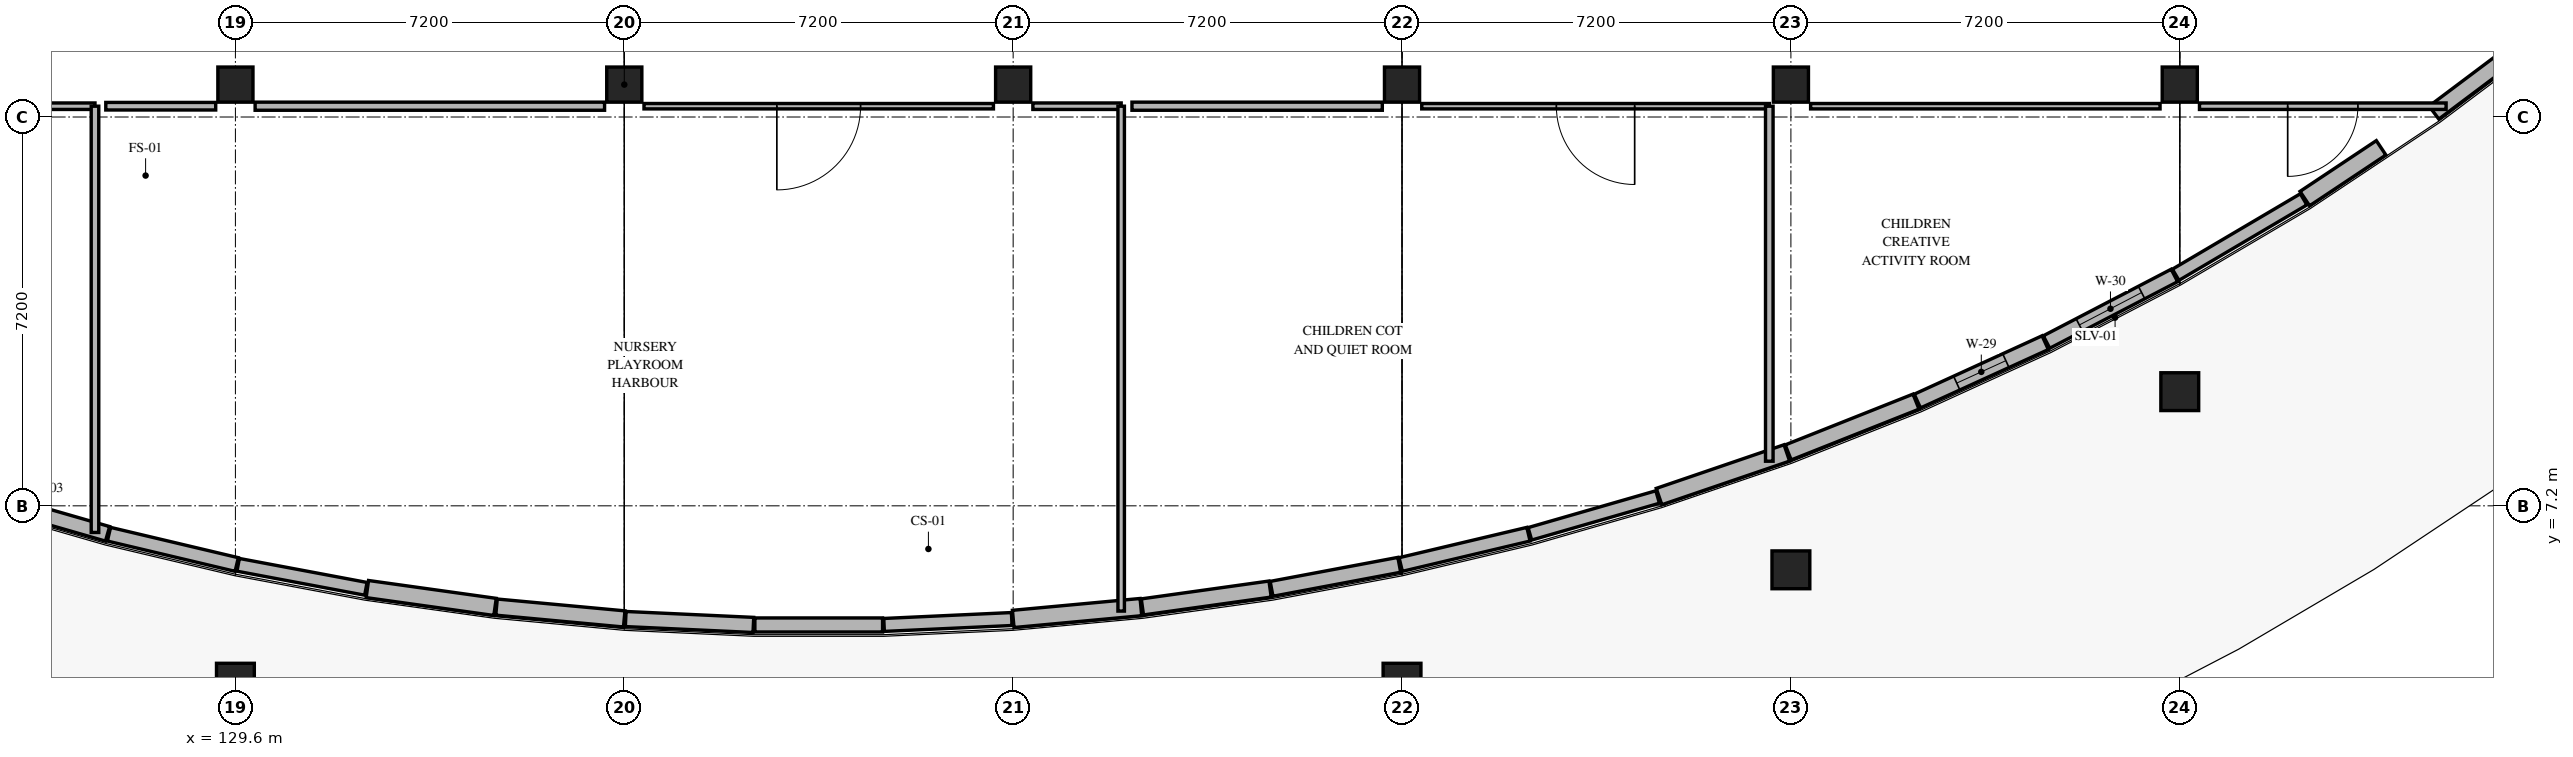
"""IFC4 building model, lengths in metres.
Left out: names, types, materials, properties, quantities, classifications, styles, units other than length and angle.
Written with IfcOpenShell. Run it as: python <this file> out.ifc"""

import sys

from ifc_helpers import new_model, si_unit, direction, frame, frame_2d, origin, origin_2d, place, context, subcontext, project, spatial, rectangle, extrude, element, fill, save


model = new_model("IFC4")
c1 = context("Model", 3, precision=1e-05, world=origin(), true_north=direction((0.0, 1.0)))
c2 = subcontext(c1, "Body", "Model", "MODEL_VIEW")
j1 = project(units=[si_unit("LENGTHUNIT", "METRE"), si_unit("PLANEANGLEUNIT", "RADIAN")], contexts=[c1])
p1 = place(None, origin())
s1 = spatial("IfcSite", under=j1, at=p1, CompositionType="ELEMENT")
p2 = place(p1, origin())
s2 = spatial("IfcBuilding", under=s1, at=p2, CompositionType="ELEMENT")
p3 = place(p2, origin())
s3 = spatial("IfcBuildingStorey", under=s2, at=p3, CompositionType="ELEMENT", Elevation=0.0)
p4 = place(p3, frame((129.6, 3.934, 0.0), z_axis=(0.0, 0.0, 1.0), x_axis=(1.0, 0.0, 0.0)))
e1 = element("IfcColumn", 1, at=p4, inside=s3, PredefinedType="COLUMN", context=c2, shape_type="SweptSolid", body=[
    extrude(rectangle(XDim=0.7, YDim=0.7, at=origin_2d()), origin(), (0.0, 0.0, 1.0), 4.5),
])
for number, where, z_axis, x_axis in (
    (2, (129.6, 15.0, 0.0), (0.0, 0.0, 1.0), (1.0, 0.0, 0.0)),
    (3, (136.8, 15.0, 0.0), (0.0, 0.0, 1.0), (1.0, 0.0, 0.0)),
    (4, (144.0, 15.0, 0.0), (0.0, 0.0, 1.0), (1.0, 0.0, 0.0)),
):
    element("IfcColumn", number, at=place(p3, frame(where, z_axis=z_axis, x_axis=x_axis)), inside=s3, PredefinedType="COLUMN", context=c2, shape_type="SweptSolid", body=[
        extrude(rectangle(XDim=0.65, YDim=0.65, at=origin_2d()), origin(), (0.0, 0.0, 1.0), 4.5),
    ])
p5 = place(p3, frame((151.2, 3.934, 0.0), z_axis=(0.0, 0.0, 1.0), x_axis=(1.0, 0.0, 0.0)))
e5 = element("IfcColumn", 5, at=p5, inside=s3, PredefinedType="COLUMN", context=c2, shape_type="SweptSolid", body=[
    extrude(rectangle(XDim=0.7, YDim=0.7, at=origin_2d()), origin(), (0.0, 0.0, 1.0), 4.5),
])
p6 = place(p3, frame((151.2, 15.0, 0.0), z_axis=(0.0, 0.0, 1.0), x_axis=(1.0, 0.0, 0.0)))
e6 = element("IfcColumn", 6, at=p6, inside=s3, PredefinedType="COLUMN", context=c2, shape_type="SweptSolid", body=[
    extrude(rectangle(XDim=0.65, YDim=0.65, at=origin_2d()), origin(), (0.0, 0.0, 1.0), 4.5),
])
p7 = place(p3, frame((158.4, 6.015, 0.0), z_axis=(0.0, 0.0, 1.0), x_axis=(1.0, 0.0, 0.0)))
e7 = element("IfcColumn", 7, at=p7, inside=s3, PredefinedType="COLUMN", context=c2, shape_type="SweptSolid", body=[
    extrude(rectangle(XDim=0.7, YDim=0.7, at=origin_2d()), origin(), (0.0, 0.0, 1.0), 4.5),
])
p8 = place(p3, frame((158.4, 15.0, 0.0), z_axis=(0.0, 0.0, 1.0), x_axis=(1.0, 0.0, 0.0)))
e8 = element("IfcColumn", 8, at=p8, inside=s3, PredefinedType="COLUMN", context=c2, shape_type="SweptSolid", body=[
    extrude(rectangle(XDim=0.65, YDim=0.65, at=origin_2d()), origin(), (0.0, 0.0, 1.0), 4.5),
])
p9 = place(p3, frame((165.6, 9.314, 0.0), z_axis=(0.0, 0.0, 1.0), x_axis=(1.0, 0.0, 0.0)))
e9 = element("IfcColumn", 9, at=p9, inside=s3, PredefinedType="COLUMN", context=c2, shape_type="SweptSolid", body=[
    extrude(rectangle(XDim=0.7, YDim=0.7, at=origin_2d()), origin(), (0.0, 0.0, 1.0), 4.5),
])
p10 = place(p3, frame((165.6, 15.0, 0.0), z_axis=(0.0, 0.0, 1.0), x_axis=(1.0, 0.0, 0.0)))
e10 = element("IfcColumn", 10, at=p10, inside=s3, PredefinedType="COLUMN", context=c2, shape_type="SweptSolid", body=[
    extrude(rectangle(XDim=0.65, YDim=0.65, at=origin_2d()), origin(), (0.0, 0.0, 1.0), 4.5),
])
p11 = place(p3, frame((127.233, 6.681, 0.0), z_axis=(0.0, 0.0, 1.0), x_axis=(-0.960873855282, 0.276986343049, 0.0)))
e11 = element("IfcWall", 11, at=p11, inside=s3, PredefinedType="SOLIDWALL", context=c2, shape_type="SweptSolid", body=[
    extrude(rectangle(XDim=2.462, YDim=0.28, at=frame_2d((1.231, 0.0))), origin(), (0.0, 0.0, 1.0), 4.24),
])
p12 = place(p3, frame((129.624, 6.113, 0.0), z_axis=(0.0, 0.0, 1.0), x_axis=(-0.972996641293, 0.230819271363, 0.0)))
e12 = element("IfcWall", 12, at=p12, inside=s3, PredefinedType="SOLIDWALL", context=c2, shape_type="SweptSolid", body=[
    extrude(rectangle(XDim=2.431, YDim=0.26, at=frame_2d((1.215, 0.0))), origin(), (0.0, 0.0, 1.0), 3.49),
])
p13 = place(p3, frame((132.015, 5.663, 0.0), z_axis=(0.0, 0.0, 1.0), x_axis=(-0.982797435053, 0.184686766319, 0.0)))
e13 = element("IfcWall", 13, at=p13, inside=s3, PredefinedType="SOLIDWALL", context=c2, shape_type="SweptSolid", body=[
    extrude(rectangle(XDim=2.406, YDim=0.24, at=frame_2d((1.203, 0.0))), origin(), (0.0, 0.0, 1.0), 3.49),
])
p14 = place(p3, frame((134.407, 5.328, 0.0), z_axis=(0.0, 0.0, 1.0), x_axis=(-0.990366445451, 0.138471310114, 0.0)))
e14 = element("IfcWall", 14, at=p14, inside=s3, PredefinedType="SOLIDWALL", context=c2, shape_type="SweptSolid", body=[
    extrude(rectangle(XDim=2.387, YDim=0.32, at=frame_2d((1.194, 0.0))), origin(), (0.0, 0.0, 1.0), 4.24),
])
p15 = place(p3, frame((136.799, 5.106, 0.0), z_axis=(0.0, 0.0, 1.0), x_axis=(-0.995736652078, 0.092241637603, 0.0)))
e15 = element("IfcWall", 15, at=p15, inside=s3, PredefinedType="SOLIDWALL", context=c2, shape_type="SweptSolid", body=[
    extrude(rectangle(XDim=2.374, YDim=0.3, at=frame_2d((1.187, 0.0))), origin(), (0.0, 0.0, 1.0), 4.24),
])
p16 = place(p3, frame((139.19, 4.994, 0.0), z_axis=(0.0, 0.0, 1.0), x_axis=(-0.998931193279, 0.046221976305, 0.0)))
e16 = element("IfcWall", 16, at=p16, inside=s3, PredefinedType="SOLIDWALL", context=c2, shape_type="SweptSolid", body=[
    extrude(rectangle(XDim=2.366, YDim=0.28, at=frame_2d((1.183, 0.0))), origin(), (0.0, 0.0, 1.0), 4.24),
])
p17 = place(p3, frame((141.582, 4.994, 0.0), z_axis=(0.0, 0.0, 1.0), x_axis=(-1.0, 0.0, 0.0)))
e17 = element("IfcWall", 17, at=p17, inside=s3, PredefinedType="SOLIDWALL", context=c2, shape_type="SweptSolid", body=[
    extrude(rectangle(XDim=2.364, YDim=0.26, at=frame_2d((1.182, 0.0))), origin(), (0.0, 0.0, 1.0), 4.24),
])
p18 = place(p3, frame((143.974, 5.104, 0.0), z_axis=(0.0, 0.0, 1.0), x_axis=(-0.998931413674, -0.046217212984, 0.0)))
e18 = element("IfcWall", 18, at=p18, inside=s3, PredefinedType="SOLIDWALL", context=c2, shape_type="SweptSolid", body=[
    extrude(rectangle(XDim=2.366, YDim=0.24, at=frame_2d((1.183, 0.0))), origin(), (0.0, 0.0, 1.0), 4.24),
])
p19 = place(p3, frame((146.365, 5.325, 0.0), z_axis=(0.0, 0.0, 1.0), x_axis=(-0.995737526905, -0.092232193477, 0.0)))
e19 = element("IfcWall", 19, at=p19, inside=s3, PredefinedType="SOLIDWALL", context=c2, shape_type="SweptSolid", body=[
    extrude(rectangle(XDim=2.374, YDim=0.32, at=frame_2d((1.187, 0.0))), origin(), (0.0, 0.0, 1.0), 4.24),
])
p20 = place(p3, frame((148.757, 5.659, 0.0), z_axis=(0.0, 0.0, 1.0), x_axis=(-0.990368406077, -0.138457286714, 0.0)))
e20 = element("IfcWall", 20, at=p20, inside=s3, PredefinedType="SOLIDWALL", context=c2, shape_type="SweptSolid", body=[
    extrude(rectangle(XDim=2.387, YDim=0.3, at=frame_2d((1.194, 0.0))), origin(), (0.0, 0.0, 1.0), 4.24),
])
p21 = place(p3, frame((151.149, 6.107, 0.0), z_axis=(0.0, 0.0, 1.0), x_axis=(-0.982800895809, -0.184668349202, 0.0)))
e21 = element("IfcWall", 21, at=p21, inside=s3, PredefinedType="SOLIDWALL", context=c2, shape_type="SweptSolid", body=[
    extrude(rectangle(XDim=2.406, YDim=0.28, at=frame_2d((1.203, 0.0))), origin(), (0.0, 0.0, 1.0), 3.54),
])
p22 = place(p3, frame((153.541, 6.674, 0.0), z_axis=(0.0, 0.0, 1.0), x_axis=(-0.973001991893, -0.230796715253, 0.0)))
e22 = element("IfcWall", 22, at=p22, inside=s3, PredefinedType="SOLIDWALL", context=c2, shape_type="SweptSolid", body=[
    extrude(rectangle(XDim=2.431, YDim=0.26, at=frame_2d((1.215, 0.0))), origin(), (0.0, 0.0, 1.0), 3.54),
])
p23 = place(p3, frame((155.933, 7.363, 0.0), z_axis=(0.0, 0.0, 1.0), x_axis=(-0.960873855282, -0.276986343049, 0.0)))
e23 = element("IfcWall", 23, at=p23, inside=s3, PredefinedType="SOLIDWALL", context=c2, shape_type="SweptSolid", body=[
    extrude(rectangle(XDim=2.462, YDim=0.24, at=frame_2d((1.231, 0.0))), origin(), (0.0, 0.0, 1.0), 4.24),
])
p24 = place(p3, frame((158.325, 8.179, 0.0), z_axis=(0.0, 0.0, 1.0), x_axis=(-0.946353497829, -0.323133187939, 0.0)))
e24 = element("IfcWall", 24, at=p24, inside=s3, PredefinedType="SOLIDWALL", context=c2, shape_type="SweptSolid", body=[
    extrude(rectangle(XDim=2.5, YDim=0.32, at=frame_2d((1.25, 0.0))), origin(), (0.0, 0.0, 1.0), 3.49),
])
p25 = place(p3, frame((160.717, 9.129, 0.0), z_axis=(0.0, 0.0, 1.0), x_axis=(-0.929287640724, -0.369356847504, 0.0)))
e25 = element("IfcWall", 25, at=p25, inside=s3, PredefinedType="SOLIDWALL", context=c2, shape_type="SweptSolid", body=[
    extrude(rectangle(XDim=2.547, YDim=0.3, at=frame_2d((1.273, 0.0))), origin(), (0.0, 0.0, 1.0), 3.49),
])
p26 = place(p3, frame((163.109, 10.221, 0.0), z_axis=(0.0, 0.0, 1.0), x_axis=(-0.90959706885, -0.415491482873, 0.0)))
e26 = element("IfcWall", 26, at=p26, inside=s3, PredefinedType="SOLIDWALL", context=c2, shape_type="SweptSolid", body=[
    extrude(rectangle(XDim=2.603, YDim=0.28, at=frame_2d((1.301, 0.0))), origin(), (0.0, 0.0, 1.0), 3.64),
])
p27 = place(p26, frame((0.801, 0.0, 0.75)))
e27 = element("IfcOpeningElement", 27, at=p27, cuts=e26, PredefinedType="OPENING", context=c2, shape_type="SweptSolid", body=[
    extrude(rectangle(XDim=1.0, YDim=1.45, at=frame_2d((0.5, 0.725))), frame((0.0, 0.15, 0.0), z_axis=(0.0, -1.0, 0.0), x_axis=(1.0, 0.0, 0.0)), (0.0, 0.0, 1.0), 0.3),
])
p28 = place(p3, frame((165.501, 11.466, 0.0), z_axis=(0.0, 0.0, 1.0), x_axis=(-0.887029574184, -0.461712610315, 0.0)))
e28 = element("IfcWall", 28, at=p28, inside=s3, PredefinedType="SOLIDWALL", context=c2, shape_type="SweptSolid", body=[
    extrude(rectangle(XDim=2.67, YDim=0.26, at=frame_2d((1.335, 0.0))), origin(), (0.0, 0.0, 1.0), 3.59),
])
p29 = place(p28, frame((0.685, 0.0, 0.75)))
e29 = element("IfcOpeningElement", 29, at=p29, cuts=e28, PredefinedType="OPENING", context=c2, shape_type="SweptSolid", body=[
    extrude(rectangle(XDim=1.3, YDim=1.45, at=frame_2d((0.65, 0.725))), frame((0.0, 0.14, 0.0), z_axis=(0.0, -1.0, 0.0), x_axis=(1.0, 0.0, 0.0)), (0.0, 0.0, 1.0), 0.28),
])
p30 = place(p3, frame((167.893, 12.875, 0.0), z_axis=(0.0, 0.0, 1.0), x_axis=(-0.861415701697, -0.507900569866, 0.0)))
e30 = element("IfcWall", 30, at=p30, inside=s3, PredefinedType="SOLIDWALL", context=c2, shape_type="SweptSolid", body=[
    extrude(rectangle(XDim=2.75, YDim=0.24, at=frame_2d((1.375, 0.0))), origin(), (0.0, 0.0, 1.0), 3.59),
])
p31 = place(p3, frame((169.328, 13.829, 0.0), z_axis=(0.0, 0.0, 1.0), x_axis=(-0.832470617869, -0.554069192778, 0.0)))
e31 = element("IfcWall", 31, at=p31, inside=s3, PredefinedType="SOLIDWALL", context=c2, shape_type="SweptSolid", body=[
    extrude(rectangle(XDim=1.697, YDim=0.32, at=frame_2d((0.848, 0.0))), origin(), (0.0, 0.0, 1.0), 3.64),
])
p32 = place(p3, frame((172.677, 16.261, 0.0), z_axis=(0.0, 0.0, 1.0), x_axis=(-0.799762775561, -0.600316169053, 0.0)))
e32 = element("IfcWall", 32, at=p32, inside=s3, PredefinedType="SOLIDWALL", context=c2, shape_type="SweptSolid", body=[
    extrude(rectangle(XDim=2.965, YDim=0.3, at=frame_2d((1.482, 0.0))), origin(), (0.0, 0.0, 1.0), 3.49),
])
p33 = place(p3, frame((127.0, 14.6, 0.0), z_axis=(0.0, 0.0, 1.0), x_axis=(-1.0, 0.0, 0.0)))
e33 = element("IfcWall", 33, at=p33, inside=s3, PredefinedType="PARTITIONING", context=c2, shape_type="SweptSolid", body=[
    extrude(rectangle(XDim=4.235, YDim=0.12, at=frame_2d((2.118, 0.0))), origin(), (0.0, 0.0, 1.0), 4.24),
])
p34 = place(p33, frame((1.292, 0.0, 0.0)))
e34 = element("IfcOpeningElement", 34, at=p34, cuts=e33, PredefinedType="OPENING", context=c2, shape_type="SweptSolid", body=[
    extrude(rectangle(XDim=1.65, YDim=2.3, at=frame_2d((0.825, 1.15))), frame((0.0, 0.07, 0.0), z_axis=(0.0, -1.0, 0.0), x_axis=(1.0, 0.0, 0.0)), (0.0, 0.0, 1.0), 0.14),
])
p35 = place(p3, frame((127.0, 6.707, 0.0), z_axis=(0.0, 0.0, 1.0), x_axis=(0.0, 1.0, 0.0)))
e35 = element("IfcWall", 35, at=p35, inside=s3, PredefinedType="PARTITIONING", context=c2, shape_type="SweptSolid", body=[
    extrude(rectangle(XDim=7.893, YDim=0.14, at=frame_2d((3.947, 0.0))), origin(), (0.0, 0.0, 1.0), 3.72),
])
p36 = place(p3, frame((146.0, 14.6, 0.0), z_axis=(0.0, 0.0, 1.0), x_axis=(-1.0, 0.0, 0.0)))
e36 = element("IfcWall", 36, at=p36, inside=s3, PredefinedType="PARTITIONING", context=c2, shape_type="SweptSolid", body=[
    extrude(rectangle(XDim=1.635, YDim=0.12, at=frame_2d((0.817, 0.0))), origin(), (0.0, 0.0, 1.0), 4.24),
])
p37 = place(p3, frame((143.635, 14.6, 0.0), z_axis=(0.0, 0.0, 1.0), x_axis=(-1.0, 0.0, 0.0)))
e37 = element("IfcWall", 37, at=p37, inside=s3, PredefinedType="PARTITIONING", context=c2, shape_type="SweptSolid", body=[
    extrude(rectangle(XDim=6.47, YDim=0.1, at=frame_2d((3.235, 0.0))), origin(), (0.0, 0.0, 1.0), 4.24),
])
p38 = place(p37, frame((2.46, 0.0, 0.0)))
e38 = element("IfcOpeningElement", 38, at=p38, cuts=e37, PredefinedType="OPENING", context=c2, shape_type="SweptSolid", body=[
    extrude(rectangle(XDim=1.55, YDim=2.25, at=frame_2d((0.775, 1.125))), frame((0.0, 0.06, 0.0), z_axis=(0.0, -1.0, 0.0), x_axis=(1.0, 0.0, 0.0)), (0.0, 0.0, 1.0), 0.12),
])
p39 = place(p3, frame((136.435, 14.6, 0.0), z_axis=(0.0, 0.0, 1.0), x_axis=(-1.0, 0.0, 0.0)))
e39 = element("IfcWall", 39, at=p39, inside=s3, PredefinedType="PARTITIONING", context=c2, shape_type="SweptSolid", body=[
    extrude(rectangle(XDim=6.47, YDim=0.15, at=frame_2d((3.235, 0.0))), origin(), (0.0, 0.0, 1.0), 4.24),
])
p40 = place(p3, frame((129.235, 14.6, 0.0), z_axis=(0.0, 0.0, 1.0), x_axis=(-1.0, 0.0, 0.0)))
e40 = element("IfcWall", 40, at=p40, inside=s3, PredefinedType="PARTITIONING", context=c2, shape_type="SweptSolid", body=[
    extrude(rectangle(XDim=2.035, YDim=0.14, at=frame_2d((1.018, 0.0))), origin(), (0.0, 0.0, 1.0), 4.24),
])
p41 = place(p3, frame((146.0, 5.251, 0.0), z_axis=(0.0, 0.0, 1.0), x_axis=(0.0, 1.0, 0.0)))
e41 = element("IfcWall", 41, at=p41, inside=s3, PredefinedType="PARTITIONING", context=c2, shape_type="SweptSolid", body=[
    extrude(rectangle(XDim=9.349, YDim=0.12, at=frame_2d((4.675, 0.0))), origin(), (0.0, 0.0, 1.0), 4.24),
])
p42 = place(p3, frame((158.0, 14.6, 0.0), z_axis=(0.0, 0.0, 1.0), x_axis=(-1.0, 0.0, 0.0)))
e42 = element("IfcWall", 42, at=p42, inside=s3, PredefinedType="PARTITIONING", context=c2, shape_type="SweptSolid", body=[
    extrude(rectangle(XDim=6.435, YDim=0.1, at=frame_2d((3.218, 0.0))), origin(), (0.0, 0.0, 1.0), 4.24),
])
p43 = place(p42, frame((2.492, 0.0, 0.0)))
e43 = element("IfcOpeningElement", 43, at=p43, cuts=e42, PredefinedType="OPENING", context=c2, shape_type="SweptSolid", body=[
    extrude(rectangle(XDim=1.45, YDim=2.25, at=frame_2d((0.725, 1.125))), frame((0.0, 0.06, 0.0), z_axis=(0.0, -1.0, 0.0), x_axis=(1.0, 0.0, 0.0)), (0.0, 0.0, 1.0), 0.12),
])
p44 = place(p3, frame((150.835, 14.6, 0.0), z_axis=(0.0, 0.0, 1.0), x_axis=(-1.0, 0.0, 0.0)))
e44 = element("IfcWall", 44, at=p44, inside=s3, PredefinedType="PARTITIONING", context=c2, shape_type="SweptSolid", body=[
    extrude(rectangle(XDim=4.635, YDim=0.15, at=frame_2d((2.317, 0.0))), origin(), (0.0, 0.0, 1.0), 4.24),
])
p45 = place(p3, frame((158.0, 8.026, 0.0), z_axis=(0.0, 0.0, 1.0), x_axis=(0.0, 1.0, 0.0)))
e45 = element("IfcWall", 45, at=p45, inside=s3, PredefinedType="PARTITIONING", context=c2, shape_type="SweptSolid", body=[
    extrude(rectangle(XDim=6.574, YDim=0.14, at=frame_2d((3.287, 0.0))), origin(), (0.0, 0.0, 1.0), 3.72),
])
p46 = place(p3, frame((170.531, 14.6, 0.0), z_axis=(0.0, 0.0, 1.0), x_axis=(-1.0, 0.0, 0.0)))
e46 = element("IfcWall", 46, at=p46, inside=s3, PredefinedType="PARTITIONING", context=c2, shape_type="SweptSolid", body=[
    extrude(rectangle(XDim=4.566, YDim=0.12, at=frame_2d((2.283, 0.0))), origin(), (0.0, 0.0, 1.0), 4.24),
])
p47 = place(p46, frame((1.633, 0.0, 0.0)))
e47 = element("IfcOpeningElement", 47, at=p47, cuts=e46, PredefinedType="OPENING", context=c2, shape_type="SweptSolid", body=[
    extrude(rectangle(XDim=1.3, YDim=2.2, at=frame_2d((0.65, 1.1))), frame((0.0, 0.07, 0.0), z_axis=(0.0, -1.0, 0.0), x_axis=(1.0, 0.0, 0.0)), (0.0, 0.0, 1.0), 0.14),
])
p48 = place(p3, frame((165.235, 14.6, 0.0), z_axis=(0.0, 0.0, 1.0), x_axis=(-1.0, 0.0, 0.0)))
e48 = element("IfcWall", 48, at=p48, inside=s3, PredefinedType="PARTITIONING", context=c2, shape_type="SweptSolid", body=[
    extrude(rectangle(XDim=6.47, YDim=0.1, at=frame_2d((3.235, 0.0))), origin(), (0.0, 0.0, 1.0), 4.24),
])
p49 = place(p27, origin())
e49 = element("IfcWindow", 49, at=p49, inside=s3, PartitioningType="SINGLE_PANEL", PredefinedType="WINDOW", context=c2, shape_type="SweptSolid", body=[
    extrude(rectangle(XDim=1.0, YDim=1.45, at=frame_2d((0.5, 0.725))), frame((0.0, 0.03, 0.0), z_axis=(0.0, -1.0, 0.0), x_axis=(1.0, 0.0, 0.0)), (0.0, 0.0, 1.0), 0.06),
])
fill(e27, e49)
p50 = place(p29, origin())
e50 = element("IfcWindow", 50, at=p50, inside=s3, PartitioningType="SINGLE_PANEL", PredefinedType="WINDOW", context=c2, shape_type="SweptSolid", body=[
    extrude(rectangle(XDim=1.3, YDim=1.45, at=frame_2d((0.65, 0.725))), frame((0.0, 0.03, 0.0), z_axis=(0.0, -1.0, 0.0), x_axis=(1.0, 0.0, 0.0)), (0.0, 0.0, 1.0), 0.06),
])
fill(e29, e50)
p51 = place(p38, origin())
e51 = element("IfcDoor", 51, at=p51, inside=s3, OperationType="SINGLE_SWING_RIGHT", PredefinedType="DOOR", context=c2, shape_type="SweptSolid", body=[
    extrude(rectangle(XDim=1.55, YDim=2.25, at=frame_2d((0.775, 1.125))), frame((0.0, 0.025, 0.0), z_axis=(0.0, -1.0, 0.0), x_axis=(1.0, 0.0, 0.0)), (0.0, 0.0, 1.0), 0.05),
])
fill(e38, e51)
p52 = place(p43, origin())
e52 = element("IfcDoor", 52, at=p52, inside=s3, OperationType="SINGLE_SWING_LEFT", PredefinedType="DOOR", context=c2, shape_type="SweptSolid", body=[
    extrude(rectangle(XDim=1.45, YDim=2.25, at=frame_2d((0.725, 1.125))), frame((0.0, 0.025, 0.0), z_axis=(0.0, -1.0, 0.0), x_axis=(1.0, 0.0, 0.0)), (0.0, 0.0, 1.0), 0.05),
])
fill(e43, e52)
p53 = place(p47, origin())
e53 = element("IfcDoor", 53, at=p53, inside=s3, OperationType="SINGLE_SWING_RIGHT", PredefinedType="DOOR", context=c2, shape_type="SweptSolid", body=[
    extrude(rectangle(XDim=1.3, YDim=2.2, at=frame_2d((0.65, 1.1))), frame((0.0, 0.025, 0.0), z_axis=(0.0, -1.0, 0.0), x_axis=(1.0, 0.0, 0.0)), (0.0, 0.0, 1.0), 0.05),
])
fill(e47, e53)
save(model, sys.argv[1])
